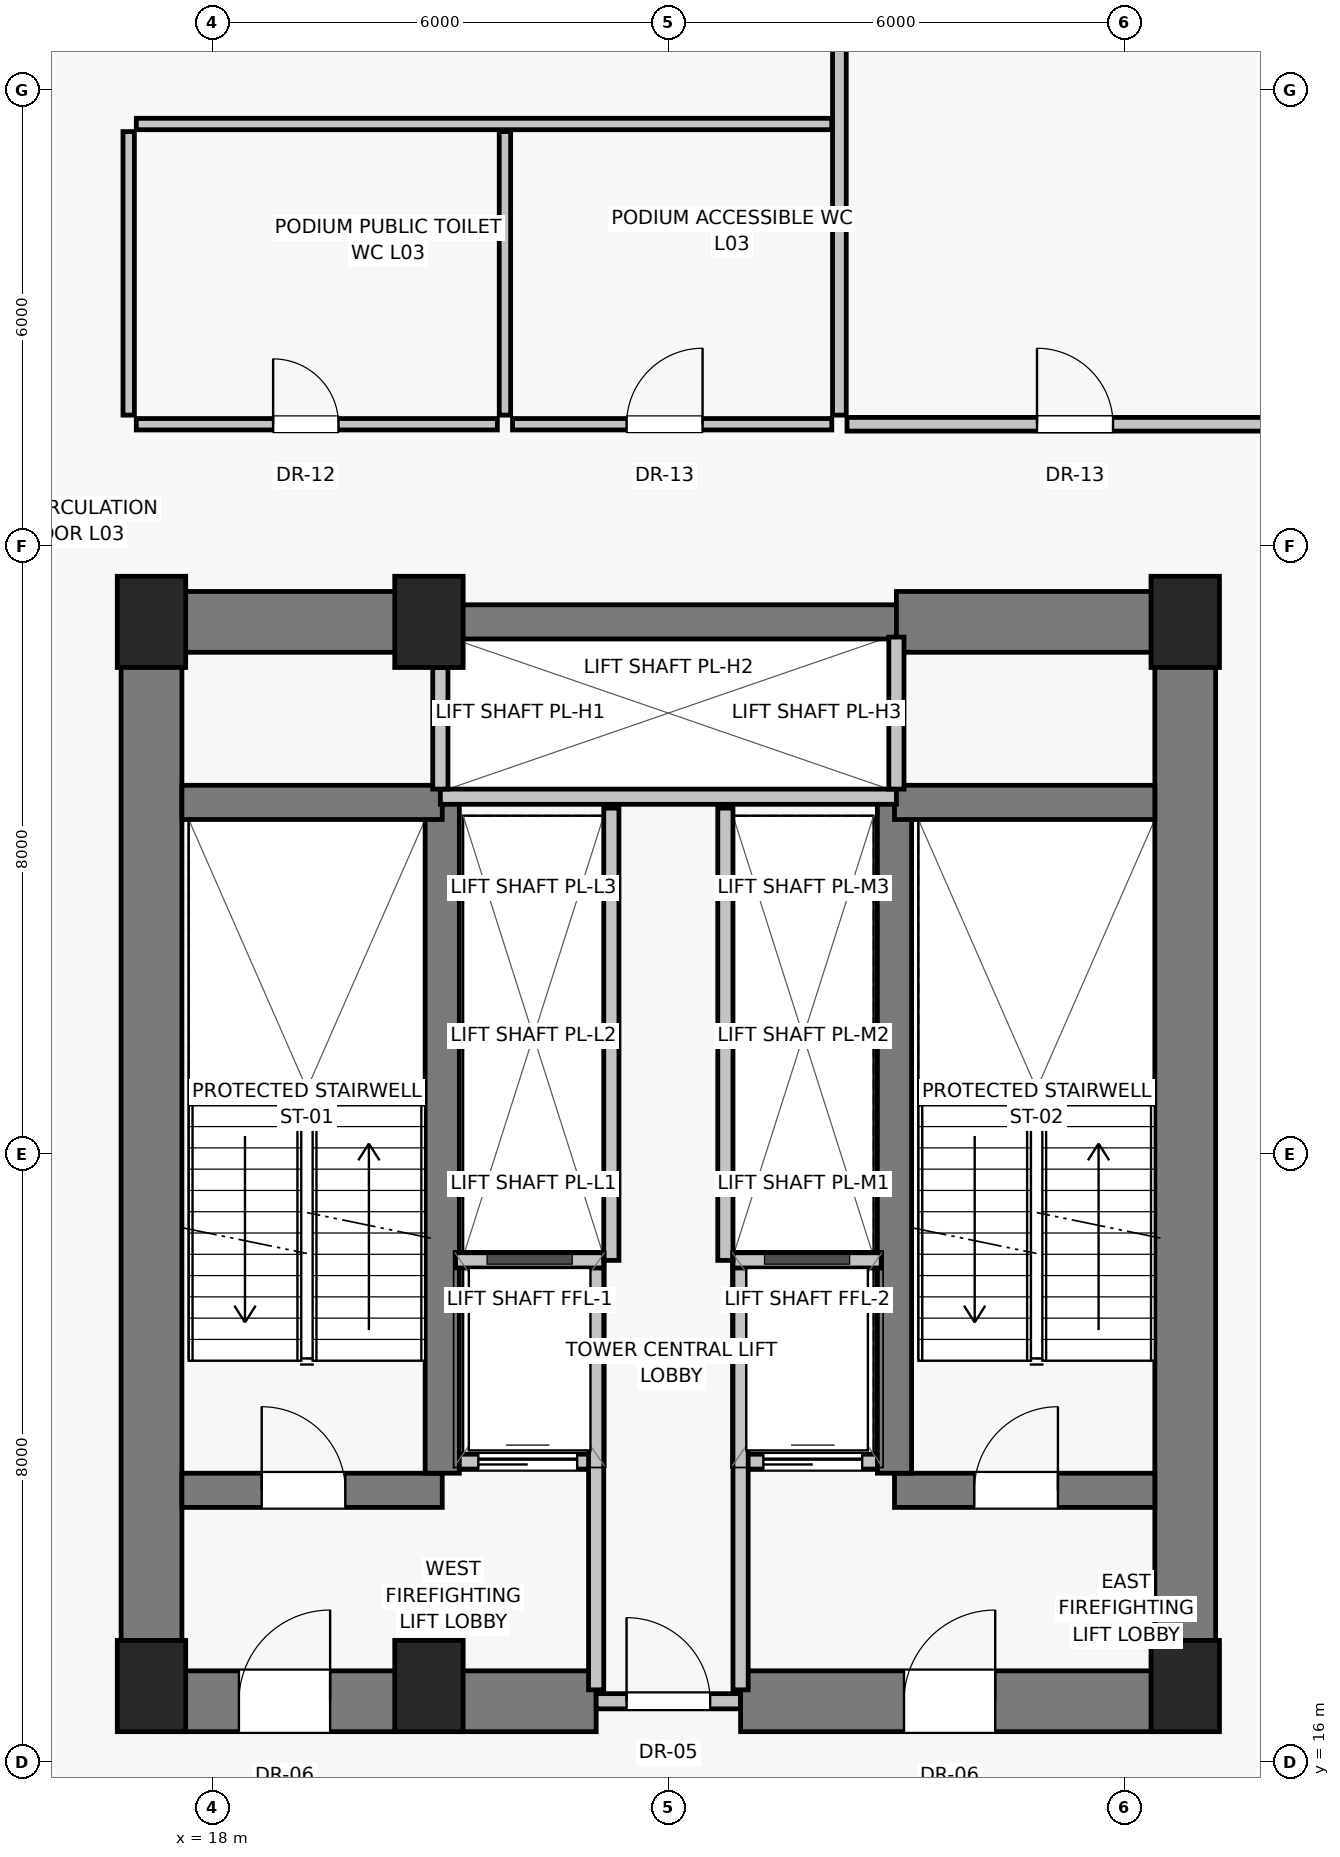
"""IFC4 building model, lengths in metres.
Left out: names, types, materials, properties, quantities, classifications, styles, units other than length and angle.
Written with IfcOpenShell. Run it as: python <this file> out.ifc"""

import sys

from ifc_helpers import new_model, si_unit, direction, frame, frame_2d, origin, origin_2d, place, context, subcontext, project, spatial, rectangle, extrude, source, transform, mapped, element, fill, save


model = new_model("IFC4")
c1 = context("Model", 3, precision=1e-05, world=origin(), true_north=direction((0.0, 1.0)))
c2 = subcontext(c1, "Body", "Model", "MODEL_VIEW")
j1 = project(units=[si_unit("LENGTHUNIT", "METRE"), si_unit("PLANEANGLEUNIT", "RADIAN")], contexts=[c1])
p1 = place(None, origin())
s1 = spatial("IfcSite", under=j1, at=p1, CompositionType="ELEMENT")
p2 = place(p1, origin())
s2 = spatial("IfcBuilding", under=s1, at=p2, CompositionType="ELEMENT")
p3 = place(p2, frame((0.0, 0.0, 14.0)))
s3 = spatial("IfcBuildingStorey", under=s2, at=p3, CompositionType="ELEMENT", Elevation=14.0)
for number, where, z_axis, x_axis in (
    (1, (17.2, 17.0, 0.0), (0.0, 0.0, 1.0), (1.0, 0.0, 0.0)),
    (2, (20.85, 17.0, 0.0), (0.0, 0.0, 1.0), (1.0, 0.0, 0.0)),
    (3, (30.8, 17.0, 0.0), (0.0, 0.0, 1.0), (1.0, 0.0, 0.0)),
    (4, (17.2, 31.0, 0.0), (0.0, 0.0, 1.0), (1.0, 0.0, 0.0)),
    (5, (20.85, 31.0, 0.0), (0.0, 0.0, 1.0), (1.0, 0.0, 0.0)),
    (6, (30.8, 31.0, 0.0), (0.0, 0.0, 1.0), (1.0, 0.0, 0.0)),
):
    element("IfcColumn", number, at=place(p3, frame(where, z_axis=z_axis, x_axis=x_axis)), inside=s3, PredefinedType="PILASTER", context=c2, shape_type="SweptSolid", body=[
        extrude(rectangle(XDim=0.9, YDim=1.2, at=origin_2d()), origin(), (0.0, 0.0, 1.0), 4.4),
    ])
for number, where, z_axis, x_axis in (
    (7, (17.2, 16.8, 0.0), (0.0, 0.0, 1.0), (0.0, 1.0, 0.0)),
    (8, (30.8, 16.8, 0.0), (0.0, 0.0, 1.0), (0.0, 1.0, 0.0)),
):
    element("IfcWall", number, at=place(p3, frame(where, z_axis=z_axis, x_axis=x_axis)), inside=s3, PredefinedType="SHEAR", context=c2, shape_type="SweptSolid", body=[
        extrude(rectangle(XDim=14.2, YDim=0.8, at=frame_2d((7.1, 0.0))), origin(), (0.0, 0.0, 1.0), 4.1),
    ])
p4 = place(p3, frame((17.2, 16.8, 0.0), z_axis=(0.0, 0.0, 1.0), x_axis=(1.0, 0.0, 0.0)))
e9 = element("IfcWall", 9, at=p4, inside=s3, PredefinedType="SHEAR", context=c2, shape_type="SweptSolid", body=[
    extrude(rectangle(XDim=5.85, YDim=0.8, at=frame_2d((2.925, 0.0))), origin(), (0.0, 0.0, 1.0), 4.1),
])
p5 = place(p4, frame((1.15, 0.0, 0.0)))
e10 = element("IfcOpeningElement", 10, at=p5, cuts=e9, PredefinedType="OPENING", context=c2, shape_type="SweptSolid", body=[
    extrude(rectangle(XDim=1.2, YDim=2.03, at=frame_2d((0.6, 1.015))), frame((0.0, 0.41, 0.0), z_axis=(0.0, -1.0, 0.0), x_axis=(1.0, 0.0, 0.0)), (0.0, 0.0, 1.0), 0.82),
])
p6 = place(p3, frame((23.05, 16.8, 0.0), z_axis=(0.0, 0.0, 1.0), x_axis=(1.0, 0.0, 0.0)))
e11 = element("IfcWall", 11, at=p6, inside=s3, PredefinedType="SOLIDWALL", context=c2, shape_type="SweptSolid", body=[
    extrude(rectangle(XDim=1.9, YDim=0.2, at=frame_2d((0.95, 0.0))), origin(), (0.0, 0.0, 1.0), 3.25),
])
p7 = place(p6, frame((0.4, 0.0, 0.0)))
e12 = element("IfcOpeningElement", 12, at=p7, cuts=e11, PredefinedType="OPENING", context=c2, shape_type="SweptSolid", body=[
    extrude(rectangle(XDim=1.1, YDim=2.03, at=frame_2d((0.55, 1.015))), frame((0.0, 0.11, 0.0), z_axis=(0.0, -1.0, 0.0), x_axis=(1.0, 0.0, 0.0)), (0.0, 0.0, 1.0), 0.22),
])
p8 = place(p3, frame((24.95, 16.8, 0.0), z_axis=(0.0, 0.0, 1.0), x_axis=(1.0, 0.0, 0.0)))
e13 = element("IfcWall", 13, at=p8, inside=s3, PredefinedType="SHEAR", context=c2, shape_type="SweptSolid", body=[
    extrude(rectangle(XDim=5.85, YDim=0.8, at=frame_2d((2.925, 0.0))), origin(), (0.0, 0.0, 1.0), 4.1),
])
p9 = place(p8, frame((2.15, 0.0, 0.0)))
e14 = element("IfcOpeningElement", 14, at=p9, cuts=e13, PredefinedType="OPENING", context=c2, shape_type="SweptSolid", body=[
    extrude(rectangle(XDim=1.2, YDim=2.03, at=frame_2d((0.6, 1.015))), frame((0.0, 0.41, 0.0), z_axis=(0.0, -1.0, 0.0), x_axis=(1.0, 0.0, 0.0)), (0.0, 0.0, 1.0), 0.82),
])
p10 = place(p3, frame((17.2, 31.0, 0.0), z_axis=(0.0, 0.0, 1.0), x_axis=(1.0, 0.0, 0.0)))
e15 = element("IfcWall", 15, at=p10, inside=s3, PredefinedType="SHEAR", context=c2, shape_type="SweptSolid", body=[
    extrude(rectangle(XDim=3.8, YDim=0.8, at=frame_2d((1.9, 0.0))), origin(), (0.0, 0.0, 1.0), 4.1),
])
p11 = place(p3, frame((21.0, 31.0, 0.0), z_axis=(0.0, 0.0, 1.0), x_axis=(1.0, 0.0, 0.0)))
e16 = element("IfcWall", 16, at=p11, inside=s3, PredefinedType="SHEAR", context=c2, shape_type="SweptSolid", body=[
    extrude(rectangle(XDim=6.0, YDim=0.45, at=frame_2d((3.0, 0.0))), origin(), (0.0, 0.0, 1.0), 4.1),
])
p12 = place(p3, frame((27.0, 31.0, 0.0), z_axis=(0.0, 0.0, 1.0), x_axis=(1.0, 0.0, 0.0)))
e17 = element("IfcWall", 17, at=p12, inside=s3, PredefinedType="SHEAR", context=c2, shape_type="SweptSolid", body=[
    extrude(rectangle(XDim=3.8, YDim=0.8, at=frame_2d((1.9, 0.0))), origin(), (0.0, 0.0, 1.0), 4.1),
])
p13 = place(p3, frame((17.6, 19.575, 0.0), z_axis=(0.0, 0.0, 1.0), x_axis=(1.0, 0.0, 0.0)))
e18 = element("IfcWall", 18, at=p13, inside=s3, PredefinedType="SHEAR", context=c2, shape_type="SweptSolid", body=[
    extrude(rectangle(XDim=3.425, YDim=0.45, at=frame_2d((1.712, 0.0))), origin(), (0.0, 0.0, 1.0), 4.1),
])
p14 = place(p13, frame((1.05, 0.0, 0.0)))
e19 = element("IfcOpeningElement", 19, at=p14, cuts=e18, PredefinedType="OPENING", context=c2, shape_type="SweptSolid", body=[
    extrude(rectangle(XDim=1.1, YDim=2.03, at=frame_2d((0.55, 1.015))), frame((0.0, 0.235, 0.0), z_axis=(0.0, -1.0, 0.0), x_axis=(1.0, 0.0, 0.0)), (0.0, 0.0, 1.0), 0.47),
])
p15 = place(p3, frame((21.2, 19.95, 0.0), z_axis=(0.0, 0.0, 1.0), x_axis=(1.0, 0.0, 0.0)))
e20 = element("IfcWall", 20, at=p15, inside=s3, PredefinedType="SOLIDWALL", context=c2, shape_type="SweptSolid", body=[
    extrude(rectangle(XDim=1.85, YDim=0.2, at=frame_2d((0.925, 0.0))), origin(), (0.0, 0.0, 1.0), 4.1),
])
p16 = place(p15, frame((0.3, 0.0, 0.0)))
e21 = element("IfcOpeningElement", 21, at=p16, cuts=e20, PredefinedType="OPENING", context=c2, shape_type="SweptSolid", body=[
    extrude(rectangle(XDim=1.3, YDim=2.25, at=frame_2d((0.65, 1.125))), frame((0.0, 0.11, 0.0), z_axis=(0.0, -1.0, 0.0), x_axis=(1.0, 0.0, 0.0)), (0.0, 0.0, 1.0), 0.22),
])
p17 = place(p3, frame((24.95, 19.95, 0.0), z_axis=(0.0, 0.0, 1.0), x_axis=(1.0, 0.0, 0.0)))
e22 = element("IfcWall", 22, at=p17, inside=s3, PredefinedType="SOLIDWALL", context=c2, shape_type="SweptSolid", body=[
    extrude(rectangle(XDim=1.85, YDim=0.2, at=frame_2d((0.925, 0.0))), origin(), (0.0, 0.0, 1.0), 4.1),
])
p18 = place(p17, frame((0.3, 0.0, 0.0)))
e23 = element("IfcOpeningElement", 23, at=p18, cuts=e22, PredefinedType="OPENING", context=c2, shape_type="SweptSolid", body=[
    extrude(rectangle(XDim=1.3, YDim=2.25, at=frame_2d((0.65, 1.125))), frame((0.0, 0.11, 0.0), z_axis=(0.0, -1.0, 0.0), x_axis=(1.0, 0.0, 0.0)), (0.0, 0.0, 1.0), 0.22),
])
p19 = place(p3, frame((26.975, 19.575, 0.0), z_axis=(0.0, 0.0, 1.0), x_axis=(1.0, 0.0, 0.0)))
e24 = element("IfcWall", 24, at=p19, inside=s3, PredefinedType="SHEAR", context=c2, shape_type="SweptSolid", body=[
    extrude(rectangle(XDim=3.425, YDim=0.45, at=frame_2d((1.712, 0.0))), origin(), (0.0, 0.0, 1.0), 4.1),
])
p20 = place(p19, frame((1.05, 0.0, 0.0)))
e25 = element("IfcOpeningElement", 25, at=p20, cuts=e24, PredefinedType="OPENING", context=c2, shape_type="SweptSolid", body=[
    extrude(rectangle(XDim=1.1, YDim=2.03, at=frame_2d((0.55, 1.015))), frame((0.0, 0.235, 0.0), z_axis=(0.0, -1.0, 0.0), x_axis=(1.0, 0.0, 0.0)), (0.0, 0.0, 1.0), 0.47),
])
for number, where, z_axis, x_axis in (
    (26, (21.025, 19.8, 0.0), (0.0, 0.0, 1.0), (0.0, 1.0, 0.0)),
    (27, (26.975, 19.8, 0.0), (0.0, 0.0, 1.0), (0.0, 1.0, 0.0)),
):
    element("IfcWall", number, at=place(p3, frame(where, z_axis=z_axis, x_axis=x_axis)), inside=s3, PredefinedType="SHEAR", context=c2, shape_type="SweptSolid", body=[
        extrude(rectangle(XDim=8.825, YDim=0.45, at=frame_2d((4.413, 0.0))), origin(), (0.0, 0.0, 1.0), 4.1),
    ])
for number, where, z_axis, x_axis in (
    (28, (17.6, 28.625, 0.0), (0.0, 0.0, 1.0), (1.0, 0.0, 0.0)),
    (29, (26.975, 28.625, 0.0), (0.0, 0.0, 1.0), (1.0, 0.0, 0.0)),
):
    element("IfcWall", number, at=place(p3, frame(where, z_axis=z_axis, x_axis=x_axis)), inside=s3, PredefinedType="SHEAR", context=c2, shape_type="SweptSolid", body=[
        extrude(rectangle(XDim=3.425, YDim=0.45, at=frame_2d((1.712, 0.0))), origin(), (0.0, 0.0, 1.0), 4.1),
    ])
for number, where, z_axis, x_axis in (
    (30, (23.05, 16.95, 0.0), (0.0, 0.0, 1.0), (0.0, 1.0, 0.0)),
    (31, (24.95, 16.95, 0.0), (0.0, 0.0, 1.0), (0.0, 1.0, 0.0)),
):
    element("IfcWall", number, at=place(p3, frame(where, z_axis=z_axis, x_axis=x_axis)), inside=s3, PredefinedType="SOLIDWALL", context=c2, shape_type="SweptSolid", body=[
        extrude(rectangle(XDim=5.6, YDim=0.2, at=frame_2d((2.8, 0.0))), origin(), (0.0, 0.0, 1.0), 4.1),
    ])
for number, where, z_axis, x_axis in (
    (32, (21.2, 22.6, 0.0), (0.0, 0.0, 1.0), (1.0, 0.0, 0.0)),
    (33, (24.85, 22.6, 0.0), (0.0, 0.0, 1.0), (1.0, 0.0, 0.0)),
):
    element("IfcWall", number, at=place(p3, frame(where, z_axis=z_axis, x_axis=x_axis)), inside=s3, PredefinedType="SOLIDWALL", context=c2, shape_type="SweptSolid", body=[
        extrude(rectangle(XDim=1.95, YDim=0.2, at=frame_2d((0.975, 0.0))), origin(), (0.0, 0.0, 1.0), 4.1),
    ])
p21 = place(p3, frame((21.0, 28.7, 0.0), z_axis=(0.0, 0.0, 1.0), x_axis=(1.0, 0.0, 0.0)))
e34 = element("IfcWall", 34, at=p21, inside=s3, PredefinedType="SOLIDWALL", context=c2, shape_type="SweptSolid", body=[
    extrude(rectangle(XDim=6.0, YDim=0.2, at=frame_2d((3.0, 0.0))), origin(), (0.0, 0.0, 1.0), 4.1),
])
p22 = place(p3, frame((21.0, 28.8, 0.0), z_axis=(0.0, 0.0, 1.0), x_axis=(0.0, 1.0, 0.0)))
e35 = element("IfcWall", 35, at=p22, inside=s3, PredefinedType="SOLIDWALL", context=c2, shape_type="SweptSolid", body=[
    extrude(rectangle(XDim=1.6, YDim=0.2, at=frame_2d((0.8, 0.0))), origin(), (0.0, 0.0, 1.0), 4.1),
])
p23 = place(p3, frame((27.0, 28.8, 0.0), z_axis=(0.0, 0.0, 1.0), x_axis=(0.0, 1.0, 0.0)))
e36 = element("IfcWall", 36, at=p23, inside=s3, PredefinedType="SOLIDWALL", context=c2, shape_type="SweptSolid", body=[
    extrude(rectangle(XDim=2.0, YDim=0.2, at=frame_2d((1.0, 0.0))), origin(), (0.0, 0.0, 1.0), 4.1),
])
for number, where, z_axis, x_axis in (
    (37, (23.25, 22.6, 0.0), (0.0, 0.0, 1.0), (0.0, 1.0, 0.0)),
    (38, (24.75, 22.6, 0.0), (0.0, 0.0, 1.0), (0.0, 1.0, 0.0)),
):
    element("IfcWall", number, at=place(p3, frame(where, z_axis=z_axis, x_axis=x_axis)), inside=s3, PredefinedType="SOLIDWALL", context=c2, shape_type="SweptSolid", body=[
        extrude(rectangle(XDim=5.95, YDim=0.2, at=frame_2d((2.975, 0.0))), origin(), (0.0, 0.0, 1.0), 4.1),
    ])
p24 = place(p3, frame((17.0, 33.6, 0.0), z_axis=(0.0, 0.0, 1.0), x_axis=(1.0, 0.0, 0.0)))
e39 = element("IfcWall", 39, at=p24, inside=s3, PredefinedType="PARTITIONING", context=c2, shape_type="SweptSolid", body=[
    extrude(rectangle(XDim=4.75, YDim=0.15, at=frame_2d((2.375, 0.0))), origin(), (0.0, 0.0, 1.0), 4.1),
])
p25 = place(p24, frame((1.8, 0.0, 0.0)))
e40 = element("IfcOpeningElement", 40, at=p25, cuts=e39, PredefinedType="OPENING", context=c2, shape_type="SweptSolid", body=[
    extrude(rectangle(XDim=0.86, YDim=2.01, at=frame_2d((0.43, 1.005))), frame((0.0, 0.085, 0.0), z_axis=(0.0, -1.0, 0.0), x_axis=(1.0, 0.0, 0.0)), (0.0, 0.0, 1.0), 0.17),
])
p26 = place(p3, frame((21.95, 33.6, 0.0), z_axis=(0.0, 0.0, 1.0), x_axis=(1.0, 0.0, 0.0)))
e41 = element("IfcWall", 41, at=p26, inside=s3, PredefinedType="PARTITIONING", context=c2, shape_type="SweptSolid", body=[
    extrude(rectangle(XDim=4.2, YDim=0.15, at=frame_2d((2.1, 0.0))), origin(), (0.0, 0.0, 1.0), 4.1),
])
p27 = place(p26, frame((1.5, 0.0, 0.0)))
e42 = element("IfcOpeningElement", 42, at=p27, cuts=e41, PredefinedType="OPENING", context=c2, shape_type="SweptSolid", body=[
    extrude(rectangle(XDim=1.0, YDim=2.01, at=frame_2d((0.5, 1.005))), frame((0.0, 0.085, 0.0), z_axis=(0.0, -1.0, 0.0), x_axis=(1.0, 0.0, 0.0)), (0.0, 0.0, 1.0), 0.17),
])
p28 = place(p3, frame((26.35, 33.6, 0.0), z_axis=(0.0, 0.0, 1.0), x_axis=(1.0, 0.0, 0.0)))
e43 = element("IfcWall", 43, at=p28, inside=s3, PredefinedType="PARTITIONING", context=c2, shape_type="SweptSolid", body=[
    extrude(rectangle(XDim=6.9, YDim=0.18, at=frame_2d((3.45, 0.0))), origin(), (0.0, 0.0, 1.0), 4.1),
])
p29 = place(p28, frame((2.5, 0.0, 0.0)))
e44 = element("IfcOpeningElement", 44, at=p29, cuts=e43, PredefinedType="OPENING", context=c2, shape_type="SweptSolid", body=[
    extrude(rectangle(XDim=1.0, YDim=2.01, at=frame_2d((0.5, 1.005))), frame((0.0, 0.1, 0.0), z_axis=(0.0, -1.0, 0.0), x_axis=(1.0, 0.0, 0.0)), (0.0, 0.0, 1.0), 0.2),
])
for number, where, z_axis, x_axis in (
    (45, (16.9, 33.72, 0.0), (0.0, 0.0, 1.0), (0.0, 1.0, 0.0)),
    (46, (21.85, 33.72, 0.0), (0.0, 0.0, 1.0), (0.0, 1.0, 0.0)),
):
    element("IfcWall", number, at=place(p3, frame(where, z_axis=z_axis, x_axis=x_axis)), inside=s3, PredefinedType="PARTITIONING", context=c2, shape_type="SweptSolid", body=[
        extrude(rectangle(XDim=3.73, YDim=0.15, at=frame_2d((1.865, 0.0))), origin(), (0.0, 0.0, 1.0), 4.1),
    ])
p30 = place(p3, frame((26.25, 33.72, 0.0), z_axis=(0.0, 0.0, 1.0), x_axis=(0.0, 1.0, 0.0)))
e47 = element("IfcWall", 47, at=p30, inside=s3, PredefinedType="PARTITIONING", context=c2, shape_type="SweptSolid", body=[
    extrude(rectangle(XDim=12.06, YDim=0.18, at=frame_2d((6.03, 0.0))), origin(), (0.0, 0.0, 1.0), 4.1),
])
p31 = place(p3, frame((17.0, 37.55, 0.0), z_axis=(0.0, 0.0, 1.0), x_axis=(1.0, 0.0, 0.0)))
e48 = element("IfcWall", 48, at=p31, inside=s3, PredefinedType="PARTITIONING", context=c2, shape_type="SweptSolid", body=[
    extrude(rectangle(XDim=9.15, YDim=0.15, at=frame_2d((4.575, 0.0))), origin(), (0.0, 0.0, 1.0), 4.1),
])
m1 = source(origin(), c2, "Body", "SweptSolid", [
    extrude(rectangle(XDim=1.2, YDim=2.03, at=frame_2d((0.6, 1.015))), frame((0.0, 0.025, 0.0), z_axis=(0.0, -1.0, 0.0), x_axis=(1.0, 0.0, 0.0)), (0.0, 0.0, 1.0), 0.05),
])
p32 = place(p5, origin())
e49 = element("IfcDoor", 49, at=p32, inside=s3, OperationType="SINGLE_SWING_RIGHT", PredefinedType="DOOR", context=c2, shape_type="MappedRepresentation", body=[
    mapped(m1, transform((0.0, 0.0, 0.0), scale=1.0)),
])
fill(e10, e49)
m2 = source(origin(), c2, "Body", "SweptSolid", [
    extrude(rectangle(XDim=1.1, YDim=2.03, at=frame_2d((0.55, 1.015))), frame((0.0, 0.025, 0.0), z_axis=(0.0, -1.0, 0.0), x_axis=(1.0, 0.0, 0.0)), (0.0, 0.0, 1.0), 0.05),
])
p33 = place(p7, origin())
e50 = element("IfcDoor", 50, at=p33, inside=s3, OperationType="SINGLE_SWING_LEFT", PredefinedType="DOOR", context=c2, shape_type="MappedRepresentation", body=[
    mapped(m2, transform((0.0, 0.0, 0.0), scale=1.0)),
])
fill(e12, e50)
p34 = place(p9, origin())
e51 = element("IfcDoor", 51, at=p34, inside=s3, OperationType="SINGLE_SWING_RIGHT", PredefinedType="DOOR", context=c2, shape_type="MappedRepresentation", body=[
    mapped(m1, transform((0.0, 0.0, 0.0), scale=1.0)),
])
fill(e14, e51)
p35 = place(p14, origin())
e52 = element("IfcDoor", 52, at=p35, inside=s3, OperationType="SINGLE_SWING_LEFT", PredefinedType="DOOR", context=c2, shape_type="MappedRepresentation", body=[
    mapped(m2, transform((0.0, 0.0, 0.0), scale=1.0)),
])
fill(e19, e52)
m3 = source(origin(), c2, "Body", "SweptSolid", [
    extrude(rectangle(XDim=1.3, YDim=2.25, at=frame_2d((0.65, 1.125))), frame((0.0, 0.025, 0.0), z_axis=(0.0, -1.0, 0.0), x_axis=(1.0, 0.0, 0.0)), (0.0, 0.0, 1.0), 0.05),
])
p36 = place(p16, origin())
e53 = element("IfcDoor", 53, at=p36, inside=s3, OperationType="SLIDING_TO_LEFT", PredefinedType="DOOR", context=c2, shape_type="MappedRepresentation", body=[
    mapped(m3, transform((0.0, 0.0, 0.0), scale=1.0)),
])
fill(e21, e53)
p37 = place(p18, origin())
e54 = element("IfcDoor", 54, at=p37, inside=s3, OperationType="SLIDING_TO_LEFT", PredefinedType="DOOR", context=c2, shape_type="MappedRepresentation", body=[
    mapped(m3, transform((0.0, 0.0, 0.0), scale=1.0)),
])
fill(e23, e54)
p38 = place(p20, origin())
e55 = element("IfcDoor", 55, at=p38, inside=s3, OperationType="SINGLE_SWING_RIGHT", PredefinedType="DOOR", context=c2, shape_type="MappedRepresentation", body=[
    mapped(m2, transform((0.0, 0.0, 0.0), scale=1.0)),
])
fill(e25, e55)
m4 = source(origin(), c2, "Body", "SweptSolid", [
    extrude(rectangle(XDim=0.86, YDim=2.01, at=frame_2d((0.43, 1.005))), frame((0.0, 0.025, 0.0), z_axis=(0.0, -1.0, 0.0), x_axis=(1.0, 0.0, 0.0)), (0.0, 0.0, 1.0), 0.05),
])
p39 = place(p25, origin())
e56 = element("IfcDoor", 56, at=p39, inside=s3, OperationType="SINGLE_SWING_LEFT", PredefinedType="DOOR", context=c2, shape_type="MappedRepresentation", body=[
    mapped(m4, transform((0.0, 0.0, 0.0), scale=1.0)),
])
fill(e40, e56)
m5 = source(origin(), c2, "Body", "SweptSolid", [
    extrude(rectangle(XDim=1.0, YDim=2.01, at=frame_2d((0.5, 1.005))), frame((0.0, 0.025, 0.0), z_axis=(0.0, -1.0, 0.0), x_axis=(1.0, 0.0, 0.0)), (0.0, 0.0, 1.0), 0.05),
])
p40 = place(p27, origin())
e57 = element("IfcDoor", 57, at=p40, inside=s3, OperationType="SINGLE_SWING_RIGHT", PredefinedType="DOOR", context=c2, shape_type="MappedRepresentation", body=[
    mapped(m5, transform((0.0, 0.0, 0.0), scale=1.0)),
])
fill(e42, e57)
p41 = place(p29, origin())
e58 = element("IfcDoor", 58, at=p41, inside=s3, OperationType="SINGLE_SWING_LEFT", PredefinedType="DOOR", context=c2, shape_type="MappedRepresentation", body=[
    mapped(m5, transform((0.0, 0.0, 0.0), scale=1.0)),
])
fill(e44, e58)
save(model, sys.argv[1])
